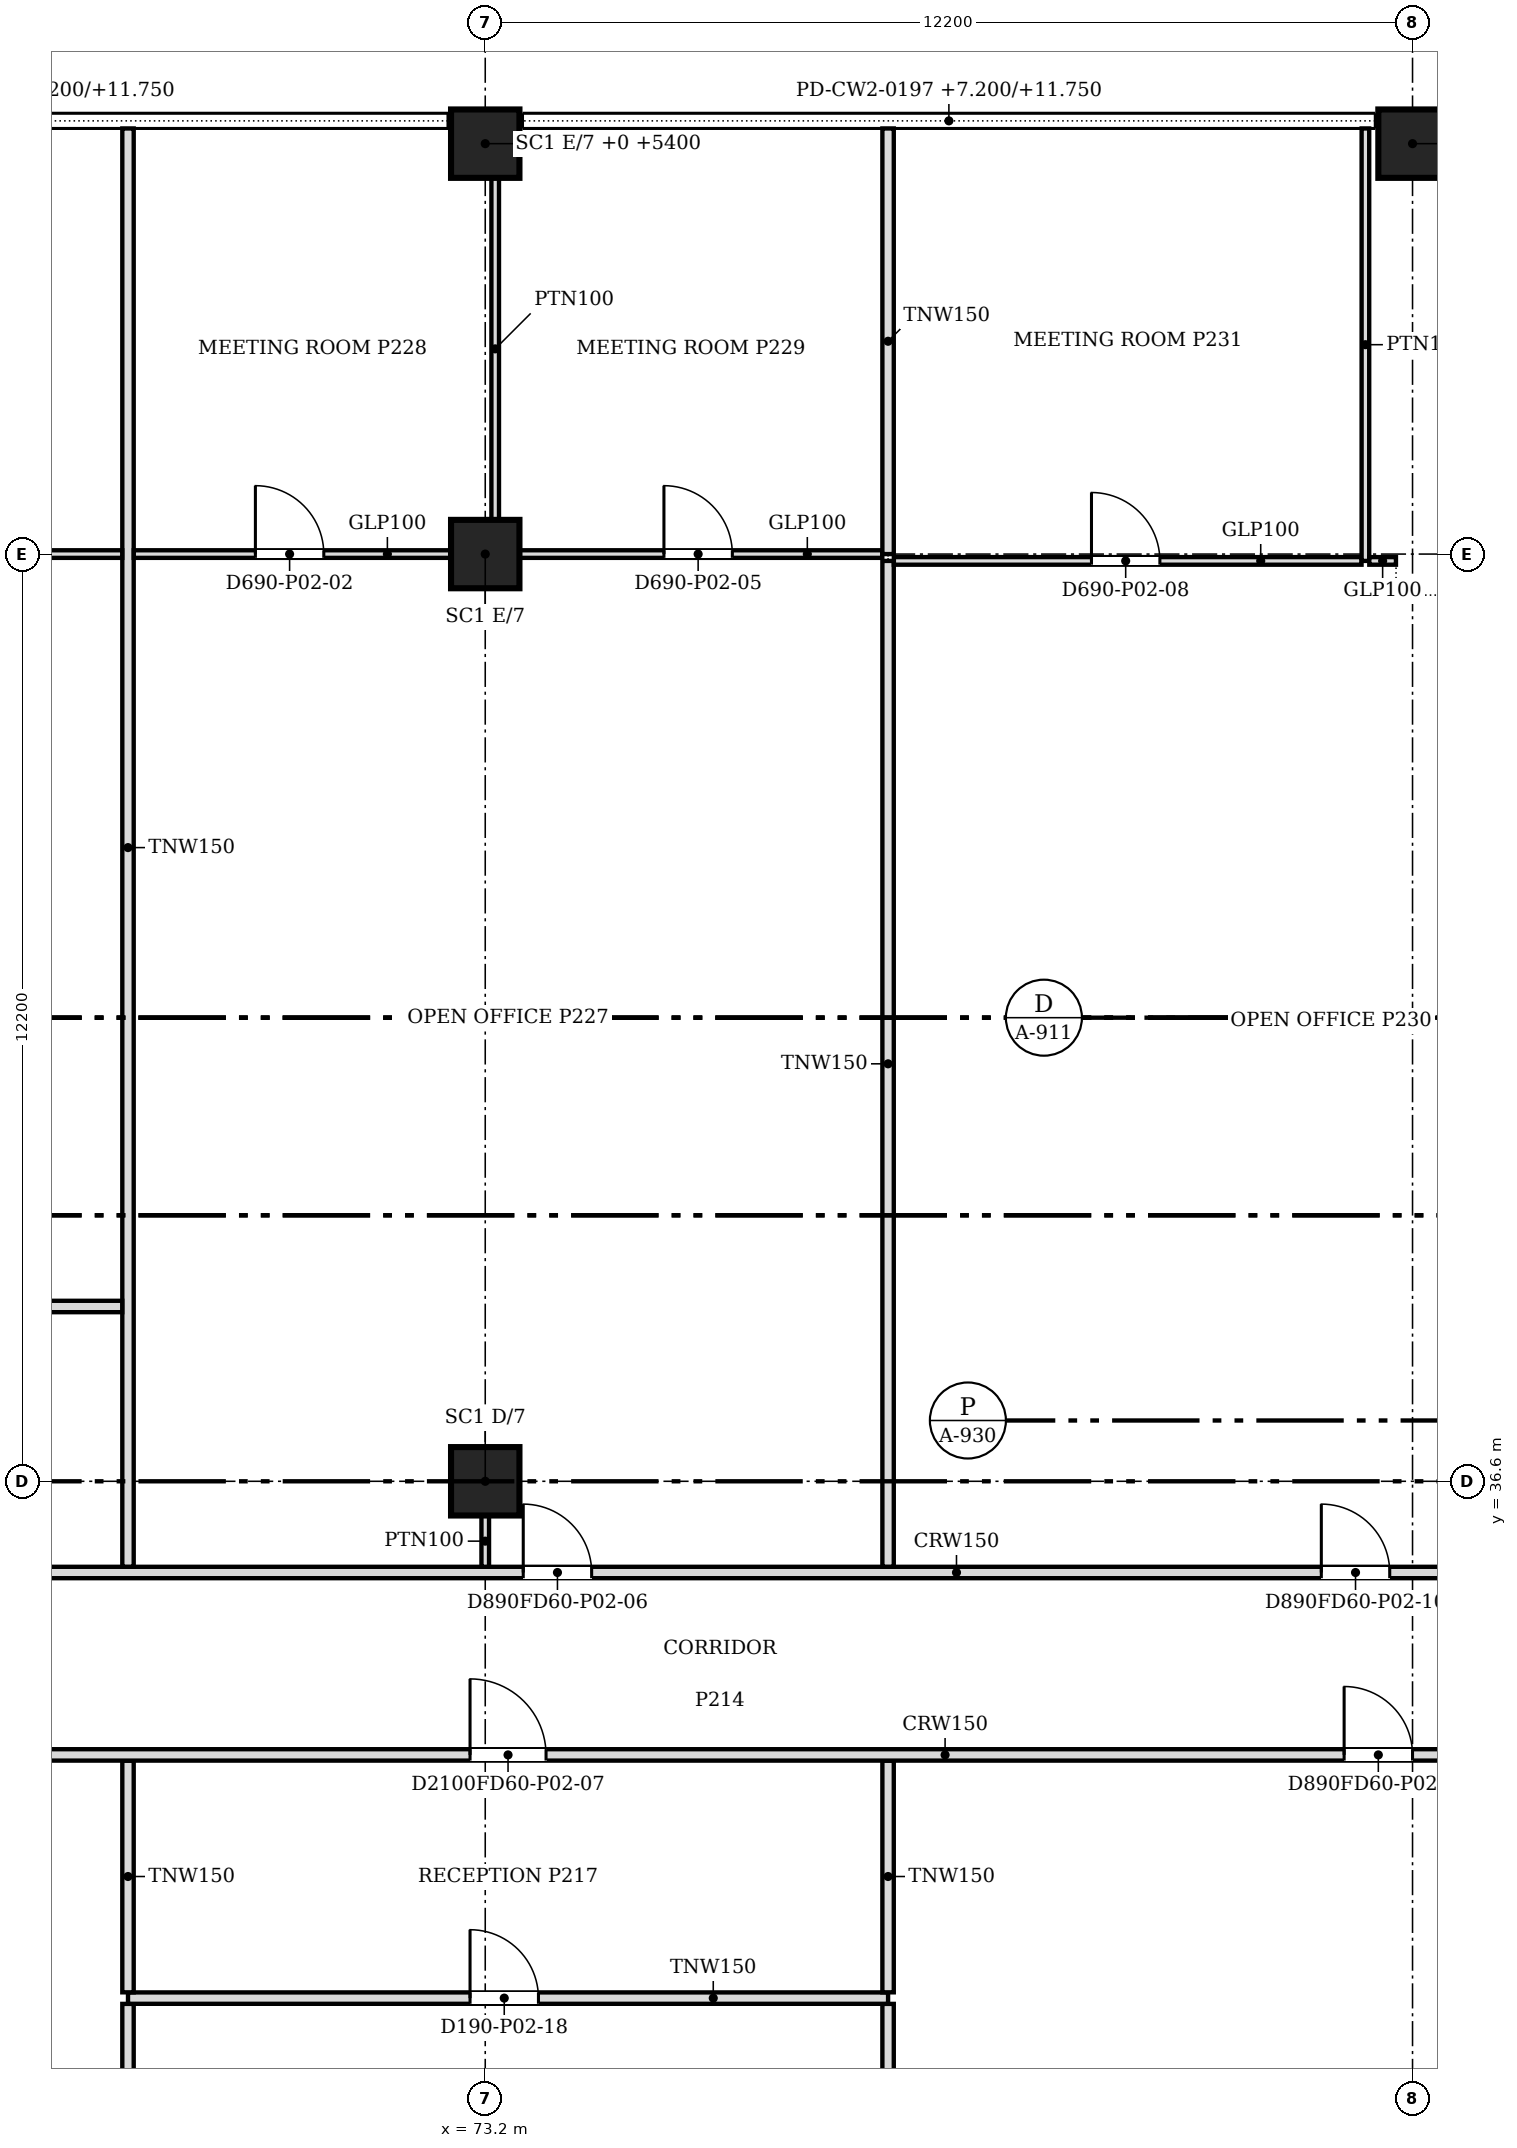
"""IFC4 building model, lengths in metres.
Left out: names, types, materials, properties, quantities, classifications, styles, units other than length and angle.
Written with IfcOpenShell. Run it as: python <this file> out.ifc"""

import sys

from ifc_helpers import new_model, si_unit, direction, frame, frame_2d, origin, origin_2d, place, context, subcontext, project, spatial, rectangle, extrude, source, transform, mapped, element, fill, save


model = new_model("IFC4")
c1 = context("Model", 3, precision=1e-05, world=origin(), true_north=direction((0.0, 1.0)))
c2 = subcontext(c1, "Body", "Model", "MODEL_VIEW")
j1 = project(units=[si_unit("LENGTHUNIT", "METRE"), si_unit("PLANEANGLEUNIT", "RADIAN")], contexts=[c1])
p1 = place(None, origin())
s1 = spatial("IfcSite", under=j1, at=p1, CompositionType="ELEMENT")
p2 = place(p1, origin())
s2 = spatial("IfcBuilding", under=s1, at=p2, CompositionType="ELEMENT")
p3 = place(p2, frame((0.0, 0.0, 7.2)))
s3 = spatial("IfcBuildingStorey", under=s2, at=p3, CompositionType="ELEMENT", Elevation=7.2)
for number, where, z_axis, x_axis in (
    (1, (85.633, 48.71, 0.0), (0.0, 0.0, 1.0), (1.0, 0.0, 0.0)),
    (2, (85.65, 36.6, 0.0), (0.0, 0.0, 1.0), (1.0, 0.0, 0.0)),
    (3, (73.2, 36.6, 0.0), (0.0, 0.0, 1.0), (1.0, 0.0, 0.0)),
    (4, (73.2, 48.8, 0.0), (0.0, 0.0, 1.0), (1.0, 0.0, 0.0)),
    (5, (73.2, 54.2, 0.0), (0.0, 0.0, 1.0), (1.0, 0.0, 0.0)),
    (6, (85.4, 54.2, 0.0), (0.0, 0.0, 1.0), (1.0, 0.0, 0.0)),
):
    element("IfcColumn", number, at=place(p3, frame(where, z_axis=z_axis, x_axis=x_axis)), inside=s3, PredefinedType="COLUMN", context=c2, shape_type="SweptSolid", body=[
        extrude(rectangle(XDim=0.9, YDim=0.9, at=origin_2d()), origin(), (0.0, 0.0, 1.0), 4.55),
    ])
p4 = place(p3, frame((78.5, 18.8, 0.0), z_axis=(0.0, 0.0, 1.0), x_axis=(0.0, 1.0, 0.0)))
e7 = element("IfcWall", 7, at=p4, inside=s3, PredefinedType="PARTITIONING", context=c2, shape_type="SweptSolid", body=[
    extrude(rectangle(XDim=10.924, YDim=0.15, at=frame_2d((5.462, 0.0))), origin(), (0.0, 0.0, 1.0), 3.715),
])
p5 = place(p3, frame((68.5, 23.62, 0.0), z_axis=(0.0, 0.0, 1.0), x_axis=(0.0, 1.0, 0.0)))
e8 = element("IfcWall", 8, at=p5, inside=s3, PredefinedType="PARTITIONING", context=c2, shape_type="SweptSolid", body=[
    extrude(rectangle(XDim=6.104, YDim=0.15, at=frame_2d((3.052, 0.0))), origin(), (0.0, 0.0, 1.0), 3.715),
])
p6 = place(p3, frame((78.5, 29.8, 0.0), z_axis=(0.0, 0.0, 1.0), x_axis=(-1.0, 0.0, 0.0)))
e9 = element("IfcWall", 9, at=p6, inside=s3, PredefinedType="PARTITIONING", context=c2, shape_type="SweptSolid", body=[
    extrude(rectangle(XDim=10.0, YDim=0.15, at=frame_2d((5.0, 0.0))), origin(), (0.0, 0.0, 1.0), 3.715),
])
m1 = source(origin(), c2, "Body", "SweptSolid", [
    extrude(rectangle(XDim=0.9, YDim=2.1, at=frame_2d((0.45, 1.05))), frame((0.0, 0.085, 0.0), z_axis=(0.0, -1.0, 0.0), x_axis=(1.0, 0.0, 0.0)), (0.0, 0.0, 1.0), 0.17),
])
p7 = place(p6, frame((4.6, 0.0, 0.0)))
e10 = element("IfcOpeningElement", 10, at=p7, cuts=e9, PredefinedType="OPENING", context=c2, shape_type="MappedRepresentation", body=[
    mapped(m1, transform((0.0, 0.0, 0.0), scale=1.0)),
])
for number, where, z_axis, x_axis in (
    (11, (68.5, 29.876, 0.0), (0.0, 0.0, 1.0), (0.0, 1.0, 0.0)),
    (12, (78.5, 29.876, 0.0), (0.0, 0.0, 1.0), (0.0, 1.0, 0.0)),
):
    element("IfcWall", number, at=place(p3, frame(where, z_axis=z_axis, x_axis=x_axis)), inside=s3, PredefinedType="PARTITIONING", context=c2, shape_type="SweptSolid", body=[
        extrude(rectangle(XDim=3.048, YDim=0.15, at=frame_2d((1.524, 0.0))), origin(), (0.0, 0.0, 1.0), 3.715),
    ])
p8 = place(p3, frame((91.5, 33.0, 0.0), z_axis=(0.0, 0.0, 1.0), x_axis=(-1.0, 0.0, 0.0)))
e13 = element("IfcWall", 13, at=p8, inside=s3, PredefinedType="PARTITIONING", context=c2, shape_type="SweptSolid", body=[
    extrude(rectangle(XDim=30.5, YDim=0.15, at=frame_2d((15.25, 0.0))), origin(), (0.0, 0.0, 1.0), 3.715),
])
p9 = place(p8, frame((26.3, 0.0, 0.0)))
e14 = element("IfcOpeningElement", 14, at=p9, cuts=e13, PredefinedType="OPENING", context=c2, shape_type="MappedRepresentation", body=[
    mapped(m1, transform((0.0, 0.0, 0.0), scale=1.0)),
])
m2 = source(origin(), c2, "Body", "SweptSolid", [
    extrude(rectangle(XDim=1.0, YDim=2.1, at=frame_2d((0.5, 1.05))), frame((0.0, 0.085, 0.0), z_axis=(0.0, -1.0, 0.0), x_axis=(1.0, 0.0, 0.0)), (0.0, 0.0, 1.0), 0.17),
])
p10 = place(p8, frame((17.5, 0.0, 0.0)))
e15 = element("IfcOpeningElement", 15, at=p10, cuts=e13, PredefinedType="OPENING", context=c2, shape_type="MappedRepresentation", body=[
    mapped(m2, transform((0.0, 0.0, 0.0), scale=1.0)),
])
p11 = place(p8, frame((6.1, 0.0, 0.0)))
e16 = element("IfcOpeningElement", 16, at=p11, cuts=e13, PredefinedType="OPENING", context=c2, shape_type="MappedRepresentation", body=[
    mapped(m1, transform((0.0, 0.0, 0.0), scale=1.0)),
])
p12 = place(p3, frame((61.0, 35.4, 0.0), z_axis=(0.0, 0.0, 1.0), x_axis=(1.0, 0.0, 0.0)))
e17 = element("IfcWall", 17, at=p12, inside=s3, PredefinedType="PARTITIONING", context=c2, shape_type="SweptSolid", body=[
    extrude(rectangle(XDim=30.5, YDim=0.15, at=frame_2d((15.25, 0.0))), origin(), (0.0, 0.0, 1.0), 3.715),
])
p13 = place(p12, frame((3.2, 0.0, 0.0)))
e18 = element("IfcOpeningElement", 18, at=p13, cuts=e17, PredefinedType="OPENING", context=c2, shape_type="MappedRepresentation", body=[
    mapped(m2, transform((0.0, 0.0, 0.0), scale=1.0)),
])
p14 = place(p12, frame((12.7, 0.0, 0.0)))
e19 = element("IfcOpeningElement", 19, at=p14, cuts=e17, PredefinedType="OPENING", context=c2, shape_type="MappedRepresentation", body=[
    mapped(m1, transform((0.0, 0.0, 0.0), scale=1.0)),
])
p15 = place(p12, frame((23.2, 0.0, 0.0)))
e20 = element("IfcOpeningElement", 20, at=p15, cuts=e17, PredefinedType="OPENING", context=c2, shape_type="MappedRepresentation", body=[
    mapped(m1, transform((0.0, 0.0, 0.0), scale=1.0)),
])
p16 = place(p3, frame((68.5, 35.476, 0.0), z_axis=(0.0, 0.0, 1.0), x_axis=(0.0, 1.0, 0.0)))
e21 = element("IfcWall", 21, at=p16, inside=s3, PredefinedType="PARTITIONING", context=c2, shape_type="SweptSolid", body=[
    extrude(rectangle(XDim=18.924, YDim=0.15, at=frame_2d((9.462, 0.0))), origin(), (0.0, 0.0, 1.0), 3.715),
])
p17 = place(p3, frame((78.5, 35.476, 0.0), z_axis=(0.0, 0.0, 1.0), x_axis=(0.0, 1.0, 0.0)))
e22 = element("IfcWall", 22, at=p17, inside=s3, PredefinedType="PARTITIONING", context=c2, shape_type="SweptSolid", body=[
    extrude(rectangle(XDim=13.234, YDim=0.15, at=frame_2d((6.617, 0.0))), origin(), (0.0, 0.0, 1.0), 3.715),
])
p18 = place(p3, frame((73.2, 36.15, 0.0), z_axis=(0.0, 0.0, 1.0), x_axis=(0.0, -1.0, 0.0)))
e23 = element("IfcWall", 23, at=p18, inside=s3, PredefinedType="PARTITIONING", context=c2, shape_type="SweptSolid", body=[
    extrude(rectangle(XDim=0.675, YDim=0.1, at=frame_2d((0.337, 0.0))), origin(), (0.0, 0.0, 1.0), 3.715),
])
p19 = place(p3, frame((61.076, 38.9, 0.0), z_axis=(0.0, 0.0, 1.0), x_axis=(1.0, 0.0, 0.0)))
e24 = element("IfcWall", 24, at=p19, inside=s3, PredefinedType="PARTITIONING", context=c2, shape_type="SweptSolid", body=[
    extrude(rectangle(XDim=7.348, YDim=0.15, at=frame_2d((3.674, 0.0))), origin(), (0.0, 0.0, 1.0), 3.715),
])
p20 = place(p19, frame((3.2, 0.0, 0.0)))
e25 = element("IfcOpeningElement", 25, at=p20, cuts=e24, PredefinedType="OPENING", context=c2, shape_type="MappedRepresentation", body=[
    mapped(m1, transform((0.0, 0.0, 0.0), scale=1.0)),
])
p21 = place(p3, frame((78.576, 48.71, 0.0), z_axis=(0.0, 0.0, 1.0), x_axis=(1.0, 0.0, 0.0)))
e26 = element("IfcWall", 26, at=p21, inside=s3, PredefinedType="PARTITIONING", context=c2, shape_type="SweptSolid", body=[
    extrude(rectangle(XDim=6.153, YDim=0.1, at=frame_2d((3.077, 0.0))), origin(), (0.0, 0.0, 1.0), 3.715),
])
m3 = source(origin(), c2, "Body", "SweptSolid", [
    extrude(rectangle(XDim=0.9, YDim=2.1, at=frame_2d((0.45, 1.05))), frame((0.0, 0.06, 0.0), z_axis=(0.0, -1.0, 0.0), x_axis=(1.0, 0.0, 0.0)), (0.0, 0.0, 1.0), 0.12),
])
p22 = place(p21, frame((2.6, 0.0, 0.0)))
e27 = element("IfcOpeningElement", 27, at=p22, cuts=e26, PredefinedType="OPENING", context=c2, shape_type="MappedRepresentation", body=[
    mapped(m3, transform((0.0, 0.0, 0.0), scale=1.0)),
])
p23 = place(p3, frame((84.78, 48.71, 0.0), z_axis=(0.0, 0.0, 1.0), x_axis=(0.0, 1.0, 0.0)))
e28 = element("IfcWall", 28, at=p23, inside=s3, PredefinedType="PARTITIONING", context=c2, shape_type="SweptSolid", body=[
    extrude(rectangle(XDim=5.69, YDim=0.1, at=frame_2d((2.845, 0.0))), origin(), (0.0, 0.0, 1.0), 3.715),
])
p24 = place(p3, frame((84.831, 48.71, 0.0), z_axis=(0.0, 0.0, 1.0), x_axis=(1.0, 0.0, 0.0)))
e29 = element("IfcWall", 29, at=p24, inside=s3, PredefinedType="PARTITIONING", context=c2, shape_type="SweptSolid", body=[
    extrude(rectangle(XDim=0.351, YDim=0.1, at=frame_2d((0.175, 0.0))), origin(), (0.0, 0.0, 1.0), 3.715),
])
p25 = place(p3, frame((61.201, 48.8, 0.0), z_axis=(0.0, 0.0, 1.0), x_axis=(1.0, 0.0, 0.0)))
e30 = element("IfcWall", 30, at=p25, inside=s3, PredefinedType="PARTITIONING", context=c2, shape_type="SweptSolid", body=[
    extrude(rectangle(XDim=7.223, YDim=0.1, at=frame_2d((3.612, 0.0))), origin(), (0.0, 0.0, 1.0), 3.715),
])
p26 = place(p25, frame((3.2, 0.0, 0.0)))
e31 = element("IfcOpeningElement", 31, at=p26, cuts=e30, PredefinedType="OPENING", context=c2, shape_type="MappedRepresentation", body=[
    mapped(m3, transform((0.0, 0.0, 0.0), scale=1.0)),
])
p27 = place(p3, frame((68.576, 48.8, 0.0), z_axis=(0.0, 0.0, 1.0), x_axis=(1.0, 0.0, 0.0)))
e32 = element("IfcWall", 32, at=p27, inside=s3, PredefinedType="PARTITIONING", context=c2, shape_type="SweptSolid", body=[
    extrude(rectangle(XDim=4.173, YDim=0.1, at=frame_2d((2.086, 0.0))), origin(), (0.0, 0.0, 1.0), 3.715),
])
p28 = place(p27, frame((1.6, 0.0, 0.0)))
e33 = element("IfcOpeningElement", 33, at=p28, cuts=e32, PredefinedType="OPENING", context=c2, shape_type="MappedRepresentation", body=[
    mapped(m3, transform((0.0, 0.0, 0.0), scale=1.0)),
])
p29 = place(p3, frame((73.651, 48.8, 0.0), z_axis=(0.0, 0.0, 1.0), x_axis=(1.0, 0.0, 0.0)))
e34 = element("IfcWall", 34, at=p29, inside=s3, PredefinedType="PARTITIONING", context=c2, shape_type="SweptSolid", body=[
    extrude(rectangle(XDim=4.773, YDim=0.1, at=frame_2d((2.387, 0.0))), origin(), (0.0, 0.0, 1.0), 3.715),
])
p30 = place(p29, frame((1.9, 0.0, 0.0)))
e35 = element("IfcOpeningElement", 35, at=p30, cuts=e34, PredefinedType="OPENING", context=c2, shape_type="MappedRepresentation", body=[
    mapped(m3, transform((0.0, 0.0, 0.0), scale=1.0)),
])
p31 = place(p3, frame((78.5, 48.8, 0.0), z_axis=(0.0, 0.0, 1.0), x_axis=(0.0, 1.0, 0.0)))
e36 = element("IfcWall", 36, at=p31, inside=s3, PredefinedType="PARTITIONING", context=c2, shape_type="SweptSolid", body=[
    extrude(rectangle(XDim=5.6, YDim=0.15, at=frame_2d((2.8, 0.0))), origin(), (0.0, 0.0, 1.0), 3.715),
])
p32 = place(p3, frame((73.331, 49.251, 0.0), z_axis=(0.0, 0.0, 1.0), x_axis=(0.0, 1.0, 0.0)))
e37 = element("IfcWall", 37, at=p32, inside=s3, PredefinedType="PARTITIONING", context=c2, shape_type="SweptSolid", body=[
    extrude(rectangle(XDim=4.498, YDim=0.1, at=frame_2d((2.249, 0.0))), origin(), (0.0, 0.0, 1.0), 3.715),
])
p33 = place(p3, frame((86.224, 51.469, 0.0), z_axis=(0.0, 0.0, 1.0), x_axis=(-1.0, 0.0, 0.0)))
e38 = element("IfcWall", 38, at=p33, inside=s3, PredefinedType="PARTITIONING", context=c2, shape_type="SweptSolid", body=[
    extrude(rectangle(XDim=1.394, YDim=0.1, at=frame_2d((0.697, 0.0))), origin(), (0.0, 0.0, 1.0), 3.715),
])
m4 = source(origin(), c2, "Body", "SweptSolid", [
    extrude(rectangle(XDim=0.9, YDim=2.1, at=frame_2d((0.45, 1.05))), frame((0.0, 0.025, 0.0), z_axis=(0.0, -1.0, 0.0), x_axis=(1.0, 0.0, 0.0)), (0.0, 0.0, 1.0), 0.05),
])
p34 = place(p28, origin())
e39 = element("IfcDoor", 39, at=p34, inside=s3, OperationType="SINGLE_SWING_LEFT", PredefinedType="DOOR", context=c2, shape_type="MappedRepresentation", body=[
    mapped(m4, transform((0.0, 0.0, 0.0), scale=1.0)),
])
fill(e33, e39)
p35 = place(p30, origin())
e40 = element("IfcDoor", 40, at=p35, inside=s3, OperationType="SINGLE_SWING_LEFT", PredefinedType="DOOR", context=c2, shape_type="MappedRepresentation", body=[
    mapped(m4, transform((0.0, 0.0, 0.0), scale=1.0)),
])
fill(e35, e40)
p36 = place(p22, origin())
e41 = element("IfcDoor", 41, at=p36, inside=s3, OperationType="SINGLE_SWING_LEFT", PredefinedType="DOOR", context=c2, shape_type="MappedRepresentation", body=[
    mapped(m4, transform((0.0, 0.0, 0.0), scale=1.0)),
])
fill(e27, e41)
m5 = source(origin(), c2, "Body", "SweptSolid", [
    extrude(rectangle(XDim=1.0, YDim=2.1, at=frame_2d((0.5, 1.05))), frame((0.0, 0.025, 0.0), z_axis=(0.0, -1.0, 0.0), x_axis=(1.0, 0.0, 0.0)), (0.0, 0.0, 1.0), 0.05),
])
p37 = place(p10, origin())
e42 = element("IfcDoor", 42, at=p37, inside=s3, OperationType="SINGLE_SWING_RIGHT", PredefinedType="DOOR", context=c2, shape_type="MappedRepresentation", body=[
    mapped(m5, transform((0.0, 0.0, 0.0), scale=1.0)),
])
fill(e15, e42)
p38 = place(p14, origin())
e43 = element("IfcDoor", 43, at=p38, inside=s3, OperationType="SINGLE_SWING_LEFT", PredefinedType="DOOR", context=c2, shape_type="MappedRepresentation", body=[
    mapped(m4, transform((0.0, 0.0, 0.0), scale=1.0)),
])
fill(e19, e43)
p39 = place(p7, origin())
e44 = element("IfcDoor", 44, at=p39, inside=s3, OperationType="SINGLE_SWING_RIGHT", PredefinedType="DOOR", context=c2, shape_type="MappedRepresentation", body=[
    mapped(m4, transform((0.0, 0.0, 0.0), scale=1.0)),
])
fill(e10, e44)
p40 = place(p11, origin())
e45 = element("IfcDoor", 45, at=p40, inside=s3, OperationType="SINGLE_SWING_RIGHT", PredefinedType="DOOR", context=c2, shape_type="MappedRepresentation", body=[
    mapped(m4, transform((0.0, 0.0, 0.0), scale=1.0)),
])
fill(e16, e45)
p41 = place(p15, origin())
e46 = element("IfcDoor", 46, at=p41, inside=s3, OperationType="SINGLE_SWING_LEFT", PredefinedType="DOOR", context=c2, shape_type="MappedRepresentation", body=[
    mapped(m4, transform((0.0, 0.0, 0.0), scale=1.0)),
])
fill(e20, e46)
save(model, sys.argv[1])
